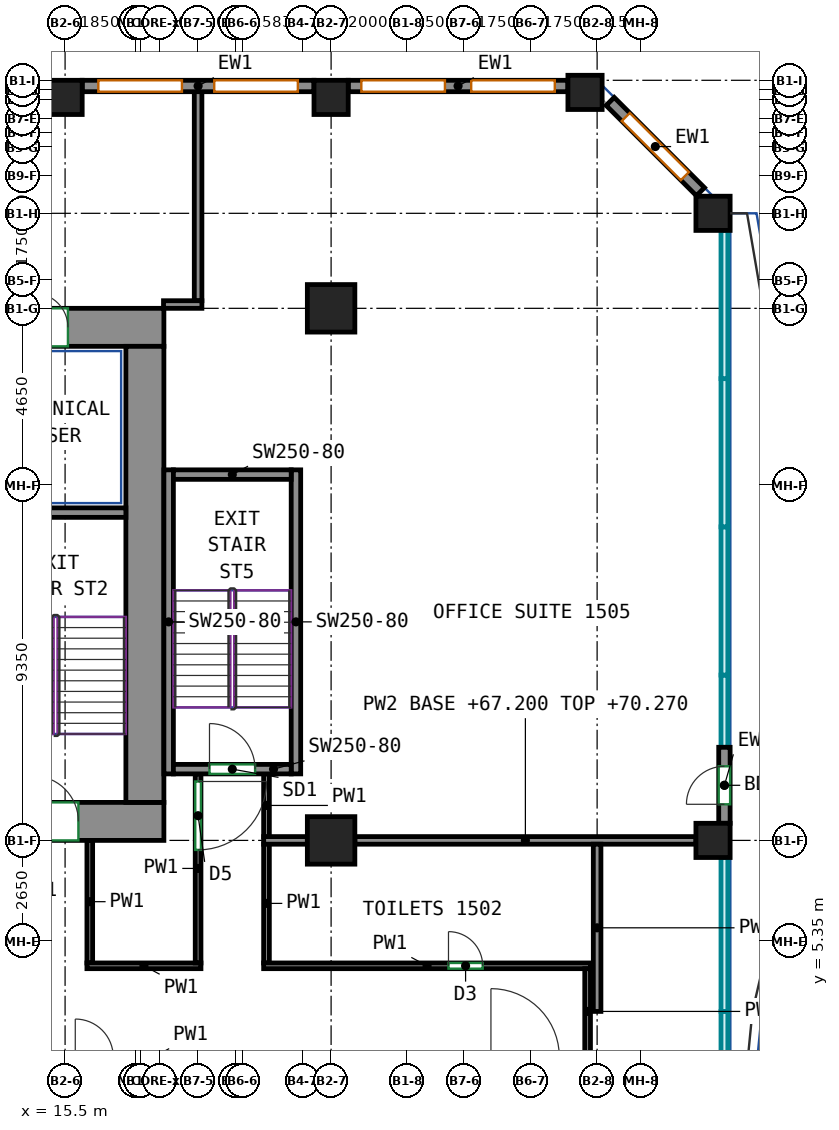
"""IFC4 building model, lengths in metres.
Left out: names, types, materials, properties, quantities, classifications, styles, units other than length and angle.
Written with IfcOpenShell. Run it as: python <this file> out.ifc"""

import sys

from ifc_helpers import new_model, si_unit, direction, frame, frame_2d, origin, origin_2d, place, context, subcontext, project, spatial, rectangle, extrude, source, transform, mapped, element, fill, save


model = new_model("IFC4")
c1 = context("Model", 3, precision=1e-05, world=origin(), true_north=direction((0.0, 1.0)))
c2 = subcontext(c1, "Body", "Model", "MODEL_VIEW")
j1 = project(units=[si_unit("LENGTHUNIT", "METRE"), si_unit("PLANEANGLEUNIT", "RADIAN")], contexts=[c1])
p1 = place(None, origin())
s1 = spatial("IfcSite", under=j1, at=p1, CompositionType="ELEMENT")
p2 = place(p1, origin())
s2 = spatial("IfcBuilding", under=s1, at=p2, CompositionType="ELEMENT")
p3 = place(p2, frame((0.0, 0.0, 67.2)))
s3 = spatial("IfcBuildingStorey", under=s2, at=p3, CompositionType="ELEMENT", Elevation=67.2)
m1 = source(origin(), c2, "Body", "SweptSolid", [
    extrude(rectangle(XDim=0.9, YDim=0.9, at=origin_2d()), origin(), (0.0, 0.0, 1.0), 3.72),
])
p4 = place(p3, frame((15.5, 27.55, 0.0), z_axis=(0.0, 0.0, 1.0), x_axis=(1.0, 0.0, 0.0)))
e1 = element("IfcColumn", 1, at=p4, inside=s3, PredefinedType="COLUMN", context=c2, shape_type="MappedRepresentation", body=[
    mapped(m1, transform((0.0, 0.0, 0.0))),
])
m2 = source(origin(), c2, "Body", "SweptSolid", [
    extrude(rectangle(XDim=1.25, YDim=1.25, at=origin_2d()), origin(), (0.0, 0.0, 1.0), 3.72),
])
for number, where, z_axis, x_axis in (
    (2, (22.5, 8.0, 0.0), (0.0, 0.0, 1.0), (1.0, 0.0, 0.0)),
    (3, (22.5, 22.0, 0.0), (0.0, 0.0, 1.0), (1.0, 0.0, 0.0)),
):
    element("IfcColumn", number, at=place(p3, frame(where, z_axis=z_axis, x_axis=x_axis)), inside=s3, PredefinedType="COLUMN", context=c2, shape_type="MappedRepresentation", body=[
        mapped(m2, transform((0.0, 0.0, 0.0))),
    ])
for number, where, z_axis, x_axis in (
    (4, (22.5, 27.55, 0.0), (0.0, 0.0, 1.0), (1.0, 0.0, 0.0)),
    (5, (29.182, 27.682, 0.0), (0.0, 0.0, 1.0), (1.0, 0.0, 0.0)),
    (6, (32.55, 8.0, 0.0), (0.0, 0.0, 1.0), (1.0, 0.0, 0.0)),
    (7, (32.55, 24.5, 0.0), (0.0, 0.0, 1.0), (1.0, 0.0, 0.0)),
):
    element("IfcColumn", number, at=place(p3, frame(where, z_axis=z_axis, x_axis=x_axis)), inside=s3, PredefinedType="COLUMN", context=c2, shape_type="MappedRepresentation", body=[
        mapped(m1, transform((0.0, 0.0, 0.0))),
    ])
m3 = source(origin(), c2, "Body", "SweptSolid", [
    extrude(rectangle(XDim=5.63, YDim=1.0, at=frame_2d((2.815, 0.0))), origin(), (0.0, 0.0, 1.0), 3.72),
])
p5 = place(p3, frame((12.47, 8.5, 0.0), z_axis=(0.0, 0.0, 1.0), x_axis=(1.0, 0.0, 0.0)))
e8 = element("IfcWall", 8, at=p5, inside=s3, PredefinedType="SHEAR", context=c2, shape_type="MappedRepresentation", body=[
    mapped(m3, transform((0.0, 0.0, 0.0))),
])
p6 = place(p5, frame((2.18, 0.0, 0.0)))
e9 = element("IfcOpeningElement", 9, at=p6, cuts=e8, PredefinedType="OPENING", context=c2, shape_type="SweptSolid", body=[
    extrude(rectangle(XDim=1.2, YDim=2.1, at=frame_2d((0.6, 1.05))), frame((0.0, 0.51, 0.0), z_axis=(0.0, -1.0, 0.0), x_axis=(1.0, 0.0, 0.0)), (0.0, 0.0, 1.0), 1.02),
])
m4 = source(origin(), c2, "Body", "SweptSolid", [
    extrude(rectangle(XDim=34.1, YDim=1.0, at=frame_2d((17.05, 0.0))), origin(), (0.0, 0.0, 1.0), 3.72),
])
p7 = place(p3, frame((-16.0, 21.5, 0.0), z_axis=(0.0, 0.0, 1.0), x_axis=(1.0, 0.0, 0.0)))
e10 = element("IfcWall", 10, at=p7, inside=s3, PredefinedType="SHEAR", context=c2, shape_type="MappedRepresentation", body=[
    mapped(m4, transform((0.0, 0.0, 0.0))),
])
p8 = place(p7, frame((8.52, 0.0, 0.0)))
e11 = element("IfcOpeningElement", 11, at=p8, cuts=e10, PredefinedType="OPENING", context=c2, shape_type="SweptSolid", body=[
    extrude(rectangle(XDim=0.9, YDim=2.1, at=frame_2d((0.45, 1.05))), frame((0.0, 0.51, 0.0), z_axis=(0.0, -1.0, 0.0), x_axis=(1.0, 0.0, 0.0)), (0.0, 0.0, 1.0), 1.02),
])
p9 = place(p7, frame((14.55, 0.0, 0.0)))
e12 = element("IfcOpeningElement", 12, at=p9, cuts=e10, PredefinedType="OPENING", context=c2, shape_type="SweptSolid", body=[
    extrude(rectangle(XDim=0.9, YDim=2.1, at=frame_2d((0.45, 1.05))), frame((0.0, 0.51, 0.0), z_axis=(0.0, -1.0, 0.0), x_axis=(1.0, 0.0, 0.0)), (0.0, 0.0, 1.0), 1.02),
])
p10 = place(p7, frame((19.374, 0.0, 0.0)))
e13 = element("IfcOpeningElement", 13, at=p10, cuts=e10, PredefinedType="OPENING", context=c2, shape_type="SweptSolid", body=[
    extrude(rectangle(XDim=0.9, YDim=2.1, at=frame_2d((0.45, 1.05))), frame((0.0, 0.51, 0.0), z_axis=(0.0, -1.0, 0.0), x_axis=(1.0, 0.0, 0.0)), (0.0, 0.0, 1.0), 1.02),
])
p11 = place(p7, frame((25.404, 0.0, 0.0)))
e14 = element("IfcOpeningElement", 14, at=p11, cuts=e10, PredefinedType="OPENING", context=c2, shape_type="SweptSolid", body=[
    extrude(rectangle(XDim=0.9, YDim=2.1, at=frame_2d((0.45, 1.05))), frame((0.0, 0.51, 0.0), z_axis=(0.0, -1.0, 0.0), x_axis=(1.0, 0.0, 0.0)), (0.0, 0.0, 1.0), 1.02),
])
p12 = place(p7, frame((2.525, 0.0, 0.0)))
e15 = element("IfcOpeningElement", 15, at=p12, cuts=e10, PredefinedType="OPENING", context=c2, shape_type="SweptSolid", body=[
    extrude(rectangle(XDim=0.9, YDim=2.1, at=frame_2d((0.45, 1.05))), frame((0.0, 0.51, 0.0), z_axis=(0.0, -1.0, 0.0), x_axis=(1.0, 0.0, 0.0)), (0.0, 0.0, 1.0), 1.02),
])
p13 = place(p7, frame((30.675, 0.0, 0.0)))
e16 = element("IfcOpeningElement", 16, at=p13, cuts=e10, PredefinedType="OPENING", context=c2, shape_type="SweptSolid", body=[
    extrude(rectangle(XDim=0.9, YDim=2.1, at=frame_2d((0.45, 1.05))), frame((0.0, 0.51, 0.0), z_axis=(0.0, -1.0, 0.0), x_axis=(1.0, 0.0, 0.0)), (0.0, 0.0, 1.0), 1.02),
])
m5 = source(origin(), c2, "Body", "SweptSolid", [
    extrude(rectangle(XDim=12.0, YDim=1.0, at=frame_2d((6.0, 0.0))), origin(), (0.0, 0.0, 1.0), 3.72),
])
p14 = place(p3, frame((17.6, 9.0, 0.0), z_axis=(0.0, 0.0, 1.0), x_axis=(0.0, 1.0, 0.0)))
e17 = element("IfcWall", 17, at=p14, inside=s3, PredefinedType="SHEAR", context=c2, shape_type="MappedRepresentation", body=[
    mapped(m5, transform((0.0, 0.0, 0.0))),
])
m6 = source(origin(), c2, "Body", "SweptSolid", [
    extrude(rectangle(XDim=3.7, YDim=0.25, at=frame_2d((1.85, 0.0))), origin(), (0.0, 0.0, 1.0), 3.72),
])
p15 = place(p3, frame((13.4, 16.625, 0.0), z_axis=(0.0, 0.0, 1.0), x_axis=(1.0, 0.0, 0.0)))
e18 = element("IfcWall", 18, at=p15, inside=s3, PredefinedType="SHEAR", context=c2, shape_type="MappedRepresentation", body=[
    mapped(m6, transform((0.0, 0.0, 0.0))),
])
m7 = source(origin(), c2, "Body", "SweptSolid", [
    extrude(rectangle(XDim=8.0, YDim=0.25, at=frame_2d((4.0, 0.0))), origin(), (0.0, 0.0, 1.0), 3.72),
])
for number, where, z_axis, x_axis in (
    (19, (18.225, 9.75, 0.0), (0.0, 0.0, 1.0), (0.0, 1.0, 0.0)),
    (20, (21.575, 9.75, 0.0), (0.0, 0.0, 1.0), (0.0, 1.0, 0.0)),
):
    element("IfcWall", number, at=place(p3, frame(where, z_axis=z_axis, x_axis=x_axis)), inside=s3, PredefinedType="SHEAR", context=c2, shape_type="MappedRepresentation", body=[
        mapped(m7, transform((0.0, 0.0, 0.0))),
    ])
m8 = source(origin(), c2, "Body", "SweptSolid", [
    extrude(rectangle(XDim=3.1, YDim=0.25, at=frame_2d((1.55, 0.0))), origin(), (0.0, 0.0, 1.0), 3.72),
])
p16 = place(p3, frame((18.35, 9.875, 0.0), z_axis=(0.0, 0.0, 1.0), x_axis=(1.0, 0.0, 0.0)))
e21 = element("IfcWall", 21, at=p16, inside=s3, PredefinedType="SHEAR", context=c2, shape_type="MappedRepresentation", body=[
    mapped(m8, transform((0.0, 0.0, 0.0))),
])
p17 = place(p16, frame((0.95, 0.0, 0.0)))
e22 = element("IfcOpeningElement", 22, at=p17, cuts=e21, PredefinedType="OPENING", context=c2, shape_type="SweptSolid", body=[
    extrude(rectangle(XDim=1.2, YDim=2.1, at=frame_2d((0.6, 1.05))), frame((0.0, 0.135, 0.0), z_axis=(0.0, -1.0, 0.0), x_axis=(1.0, 0.0, 0.0)), (0.0, 0.0, 1.0), 0.27),
])
p18 = place(p3, frame((18.35, 17.625, 0.0), z_axis=(0.0, 0.0, 1.0), x_axis=(1.0, 0.0, 0.0)))
e23 = element("IfcWall", 23, at=p18, inside=s3, PredefinedType="SHEAR", context=c2, shape_type="MappedRepresentation", body=[
    mapped(m8, transform((0.0, 0.0, 0.0))),
])
m9 = source(origin(), c2, "Body", "SweptSolid", [
    extrude(rectangle(XDim=2.0, YDim=0.3, at=frame_2d((1.0, 0.0))), origin(), (0.0, 0.0, 1.0), 3.72),
])
p19 = place(p3, frame((32.85, 8.45, 0.0), z_axis=(0.0, 0.0, 1.0), x_axis=(0.0, 1.0, 0.0)))
e24 = element("IfcWall", 24, at=p19, inside=s3, PredefinedType="SOLIDWALL", context=c2, shape_type="MappedRepresentation", body=[
    mapped(m9, transform((0.0, 0.0, 0.0))),
])
p20 = place(p19, frame((0.5, 0.0, 0.0)))
e25 = element("IfcOpeningElement", 25, at=p20, cuts=e24, PredefinedType="OPENING", context=c2, shape_type="SweptSolid", body=[
    extrude(rectangle(XDim=1.0, YDim=2.1, at=frame_2d((0.5, 1.05))), frame((0.0, 0.16, 0.0), z_axis=(0.0, -1.0, 0.0), x_axis=(1.0, 0.0, 0.0)), (0.0, 0.0, 1.0), 0.32),
])
m10 = source(origin(), c2, "Body", "SweptSolid", [
    extrude(rectangle(XDim=3.359, YDim=0.3, at=frame_2d((1.679, 0.0))), origin(), (0.0, 0.0, 1.0), 3.72),
])
p21 = place(p3, frame((32.219, 25.069, 0.0), z_axis=(0.0, 0.0, 1.0), x_axis=(-0.707070438228, 0.707143122278, 0.0)))
e26 = element("IfcWall", 26, at=p21, inside=s3, PredefinedType="SOLIDWALL", context=c2, shape_type="MappedRepresentation", body=[
    mapped(m10, transform((0.0, 0.0, 0.0))),
])
p22 = place(p21, frame((0.579, 0.0, 0.7)))
e27 = element("IfcOpeningElement", 27, at=p22, cuts=e26, PredefinedType="OPENING", context=c2, shape_type="SweptSolid", body=[
    extrude(rectangle(XDim=2.2, YDim=2.25, at=frame_2d((1.1, 1.125))), frame((0.0, 0.16, 0.0), z_axis=(0.0, -1.0, 0.0), x_axis=(1.0, 0.0, 0.0)), (0.0, 0.0, 1.0), 0.32),
])
m11 = source(origin(), c2, "Body", "SweptSolid", [
    extrude(rectangle(XDim=5.782, YDim=0.3, at=frame_2d((2.891, 0.0))), origin(), (0.0, 0.0, 1.0), 3.72),
])
p23 = place(p3, frame((28.732, 27.85, 0.0), z_axis=(0.0, 0.0, 1.0), x_axis=(-1.0, 0.0, 0.0)))
e28 = element("IfcWall", 28, at=p23, inside=s3, PredefinedType="SOLIDWALL", context=c2, shape_type="MappedRepresentation", body=[
    mapped(m11, transform((0.0, 0.0, 0.0))),
])
p24 = place(p23, frame((0.345, 0.0, 0.7)))
e29 = element("IfcOpeningElement", 29, at=p24, cuts=e28, PredefinedType="OPENING", context=c2, shape_type="SweptSolid", body=[
    extrude(rectangle(XDim=2.2, YDim=2.25, at=frame_2d((1.1, 1.125))), frame((0.0, 0.16, 0.0), z_axis=(0.0, -1.0, 0.0), x_axis=(1.0, 0.0, 0.0)), (0.0, 0.0, 1.0), 0.32),
])
p25 = place(p23, frame((3.236, 0.0, 0.7)))
e30 = element("IfcOpeningElement", 30, at=p25, cuts=e28, PredefinedType="OPENING", context=c2, shape_type="SweptSolid", body=[
    extrude(rectangle(XDim=2.2, YDim=2.25, at=frame_2d((1.1, 1.125))), frame((0.0, 0.16, 0.0), z_axis=(0.0, -1.0, 0.0), x_axis=(1.0, 0.0, 0.0)), (0.0, 0.0, 1.0), 0.32),
])
m12 = source(origin(), c2, "Body", "SweptSolid", [
    extrude(rectangle(XDim=6.1, YDim=0.3, at=frame_2d((3.05, 0.0))), origin(), (0.0, 0.0, 1.0), 3.72),
])
p26 = place(p3, frame((22.05, 27.85, 0.0), z_axis=(0.0, 0.0, 1.0), x_axis=(-1.0, 0.0, 0.0)))
e31 = element("IfcWall", 31, at=p26, inside=s3, PredefinedType="SOLIDWALL", context=c2, shape_type="MappedRepresentation", body=[
    mapped(m12, transform((0.0, 0.0, 0.0))),
])
p27 = place(p26, frame((0.425, 0.0, 0.7)))
e32 = element("IfcOpeningElement", 32, at=p27, cuts=e31, PredefinedType="OPENING", context=c2, shape_type="SweptSolid", body=[
    extrude(rectangle(XDim=2.2, YDim=2.25, at=frame_2d((1.1, 1.125))), frame((0.0, 0.16, 0.0), z_axis=(0.0, -1.0, 0.0), x_axis=(1.0, 0.0, 0.0)), (0.0, 0.0, 1.0), 0.32),
])
p28 = place(p26, frame((3.475, 0.0, 0.7)))
e33 = element("IfcOpeningElement", 33, at=p28, cuts=e31, PredefinedType="OPENING", context=c2, shape_type="SweptSolid", body=[
    extrude(rectangle(XDim=2.2, YDim=2.25, at=frame_2d((1.1, 1.125))), frame((0.0, 0.16, 0.0), z_axis=(0.0, -1.0, 0.0), x_axis=(1.0, 0.0, 0.0)), (0.0, 0.0, 1.0), 0.32),
])
p29 = place(p3, frame((16.15, 4.775, 0.0), z_axis=(0.0, 0.0, 1.0), x_axis=(0.0, 1.0, 0.0)))
e34 = element("IfcWall", 34, at=p29, inside=s3, PredefinedType="PARTITIONING", context=c2, shape_type="SweptSolid", body=[
    extrude(rectangle(XDim=3.225, YDim=0.15, at=frame_2d((1.613, 0.0))), origin(), (0.0, 0.0, 1.0), 3.72),
])
p30 = place(p3, frame((16.075, 4.7, 0.0), z_axis=(0.0, 0.0, 1.0), x_axis=(1.0, 0.0, 0.0)))
e35 = element("IfcWall", 35, at=p30, inside=s3, PredefinedType="PARTITIONING", context=c2, shape_type="SweptSolid", body=[
    extrude(rectangle(XDim=3.0, YDim=0.15, at=frame_2d((1.5, 0.0))), origin(), (0.0, 0.0, 1.0), 3.72),
])
p31 = place(p3, frame((19.0, 9.75, 0.0), z_axis=(0.0, 0.0, 1.0), x_axis=(0.0, -1.0, 0.0)))
e36 = element("IfcWall", 36, at=p31, inside=s3, PredefinedType="PARTITIONING", context=c2, shape_type="SweptSolid", body=[
    extrude(rectangle(XDim=4.975, YDim=0.15, at=frame_2d((2.488, 0.0))), origin(), (0.0, 0.0, 1.0), 3.72),
])
p32 = place(p31, frame((0.2, 0.0, 0.0)))
e37 = element("IfcOpeningElement", 37, at=p32, cuts=e36, PredefinedType="OPENING", context=c2, shape_type="SweptSolid", body=[
    extrude(rectangle(XDim=1.8, YDim=2.1, at=frame_2d((0.9, 1.05))), frame((0.0, 0.085, 0.0), z_axis=(0.0, -1.0, 0.0), x_axis=(1.0, 0.0, 0.0)), (0.0, 0.0, 1.0), 0.17),
])
p33 = place(p3, frame((20.8, 8.09, 0.0), z_axis=(0.0, 0.0, 1.0), x_axis=(0.0, 1.0, 0.0)))
e38 = element("IfcWall", 38, at=p33, inside=s3, PredefinedType="PARTITIONING", context=c2, shape_type="SweptSolid", body=[
    extrude(rectangle(XDim=1.66, YDim=0.15, at=frame_2d((0.83, 0.0))), origin(), (0.0, 0.0, 1.0), 3.72),
])
p34 = place(p3, frame((20.8, 4.775, 0.0), z_axis=(0.0, 0.0, 1.0), x_axis=(0.0, 1.0, 0.0)))
e39 = element("IfcWall", 39, at=p34, inside=s3, PredefinedType="PARTITIONING", context=c2, shape_type="SweptSolid", body=[
    extrude(rectangle(XDim=3.135, YDim=0.15, at=frame_2d((1.567, 0.0))), origin(), (0.0, 0.0, 1.0), 3.72),
])
p35 = place(p3, frame((20.725, 4.7, 0.0), z_axis=(0.0, 0.0, 1.0), x_axis=(1.0, 0.0, 0.0)))
e40 = element("IfcWall", 40, at=p35, inside=s3, PredefinedType="PARTITIONING", context=c2, shape_type="SweptSolid", body=[
    extrude(rectangle(XDim=8.6, YDim=0.15, at=frame_2d((4.3, 0.0))), origin(), (0.0, 0.0, 1.0), 3.72),
])
p36 = place(p35, frame((4.864, 0.0, 0.0)))
e41 = element("IfcOpeningElement", 41, at=p36, cuts=e40, PredefinedType="OPENING", context=c2, shape_type="SweptSolid", body=[
    extrude(rectangle(XDim=0.9, YDim=2.1, at=frame_2d((0.45, 1.05))), frame((0.0, 0.085, 0.0), z_axis=(0.0, -1.0, 0.0), x_axis=(1.0, 0.0, 0.0)), (0.0, 0.0, 1.0), 0.17),
])
p37 = place(p3, frame((29.25, 2.375, 0.0), z_axis=(0.0, 0.0, 1.0), x_axis=(0.0, 1.0, 0.0)))
e42 = element("IfcWall", 42, at=p37, inside=s3, PredefinedType="PARTITIONING", context=c2, shape_type="SweptSolid", body=[
    extrude(rectangle(XDim=2.25, YDim=0.15, at=frame_2d((1.125, 0.0))), origin(), (0.0, 0.0, 1.0), 3.07),
])
p38 = place(p3, frame((19.0, 22.2, 0.0), z_axis=(0.0, 0.0, 1.0), x_axis=(0.0, 1.0, 0.0)))
e43 = element("IfcWall", 43, at=p38, inside=s3, PredefinedType="PARTITIONING", context=c2, shape_type="SweptSolid", body=[
    extrude(rectangle(XDim=5.55, YDim=0.2, at=frame_2d((2.775, 0.0))), origin(), (0.0, 0.0, 1.0), 3.72),
])
p39 = place(p3, frame((18.09, 22.1, 0.0), z_axis=(0.0, 0.0, 1.0), x_axis=(1.0, 0.0, 0.0)))
e44 = element("IfcWall", 44, at=p39, inside=s3, PredefinedType="PARTITIONING", context=c2, shape_type="SweptSolid", body=[
    extrude(rectangle(XDim=1.01, YDim=0.2, at=frame_2d((0.505, 0.0))), origin(), (0.0, 0.0, 1.0), 3.72),
])
p40 = place(p3, frame((23.125, 8.0, 0.0), z_axis=(0.0, 0.0, 1.0), x_axis=(1.0, 0.0, 0.0)))
e45 = element("IfcWall", 45, at=p40, inside=s3, PredefinedType="PARTITIONING", context=c2, shape_type="SweptSolid", body=[
    extrude(rectangle(XDim=8.975, YDim=0.2, at=frame_2d((4.488, 0.0))), origin(), (0.0, 0.0, 1.0), 3.07),
])
p41 = place(p3, frame((20.726, 8.0, 0.0), z_axis=(0.0, 0.0, 1.0), x_axis=(1.0, 0.0, 0.0)))
e46 = element("IfcWall", 46, at=p41, inside=s3, PredefinedType="PARTITIONING", context=c2, shape_type="SweptSolid", body=[
    extrude(rectangle(XDim=1.149, YDim=0.2, at=frame_2d((0.574, 0.0))), origin(), (0.0, 0.0, 1.0), 3.72),
])
p42 = place(p3, frame((29.5, 3.5, 0.0), z_axis=(0.0, 0.0, 1.0), x_axis=(0.0, 1.0, 0.0)))
e47 = element("IfcWall", 47, at=p42, inside=s3, PredefinedType="PARTITIONING", context=c2, shape_type="SweptSolid", body=[
    extrude(rectangle(XDim=4.4, YDim=0.2, at=frame_2d((2.2, 0.0))), origin(), (0.0, 0.0, 1.0), 3.07),
])
p43 = place(p20, origin())
e48 = element("IfcDoor", 48, at=p43, inside=s3, OperationType="SINGLE_SWING_LEFT", PredefinedType="DOOR", context=c2, shape_type="SweptSolid", body=[
    extrude(rectangle(XDim=1.0, YDim=2.1, at=frame_2d((0.5, 1.05))), frame((0.0, 0.025, 0.0), z_axis=(0.0, -1.0, 0.0), x_axis=(1.0, 0.0, 0.0)), (0.0, 0.0, 1.0), 0.05),
])
fill(e25, e48)
p44 = place(p22, origin())
e49 = element("IfcWindow", 49, at=p44, inside=s3, PartitioningType="SINGLE_PANEL", PredefinedType="WINDOW", context=c2, shape_type="SweptSolid", body=[
    extrude(rectangle(XDim=2.2, YDim=2.25, at=frame_2d((1.1, 1.125))), frame((0.0, 0.03, 0.0), z_axis=(0.0, -1.0, 0.0), x_axis=(1.0, 0.0, 0.0)), (0.0, 0.0, 1.0), 0.06),
])
fill(e27, e49)
p45 = place(p24, origin())
e50 = element("IfcWindow", 50, at=p45, inside=s3, PartitioningType="SINGLE_PANEL", PredefinedType="WINDOW", context=c2, shape_type="SweptSolid", body=[
    extrude(rectangle(XDim=2.2, YDim=2.25, at=frame_2d((1.1, 1.125))), frame((0.0, 0.03, 0.0), z_axis=(0.0, -1.0, 0.0), x_axis=(1.0, 0.0, 0.0)), (0.0, 0.0, 1.0), 0.06),
])
fill(e29, e50)
p46 = place(p25, origin())
e51 = element("IfcWindow", 51, at=p46, inside=s3, PartitioningType="SINGLE_PANEL", PredefinedType="WINDOW", context=c2, shape_type="SweptSolid", body=[
    extrude(rectangle(XDim=2.2, YDim=2.25, at=frame_2d((1.1, 1.125))), frame((0.0, 0.03, 0.0), z_axis=(0.0, -1.0, 0.0), x_axis=(1.0, 0.0, 0.0)), (0.0, 0.0, 1.0), 0.06),
])
fill(e30, e51)
p47 = place(p27, origin())
e52 = element("IfcWindow", 52, at=p47, inside=s3, PartitioningType="SINGLE_PANEL", PredefinedType="WINDOW", context=c2, shape_type="SweptSolid", body=[
    extrude(rectangle(XDim=2.2, YDim=2.25, at=frame_2d((1.1, 1.125))), frame((0.0, 0.03, 0.0), z_axis=(0.0, -1.0, 0.0), x_axis=(1.0, 0.0, 0.0)), (0.0, 0.0, 1.0), 0.06),
])
fill(e32, e52)
p48 = place(p28, origin())
e53 = element("IfcWindow", 53, at=p48, inside=s3, PartitioningType="SINGLE_PANEL", PredefinedType="WINDOW", context=c2, shape_type="SweptSolid", body=[
    extrude(rectangle(XDim=2.2, YDim=2.25, at=frame_2d((1.1, 1.125))), frame((0.0, 0.03, 0.0), z_axis=(0.0, -1.0, 0.0), x_axis=(1.0, 0.0, 0.0)), (0.0, 0.0, 1.0), 0.06),
])
fill(e33, e53)
p49 = place(p13, origin())
e54 = element("IfcDoor", 54, at=p49, inside=s3, OperationType="SINGLE_SWING_LEFT", PredefinedType="DOOR", context=c2, shape_type="SweptSolid", body=[
    extrude(rectangle(XDim=0.9, YDim=2.1, at=frame_2d((0.45, 1.05))), frame((0.0, -0.355, 0.0), z_axis=(0.0, -1.0, 0.0), x_axis=(1.0, 0.0, 0.0)), (0.0, 0.0, 1.0), 0.05),
])
fill(e16, e54)
p50 = place(p6, origin())
e55 = element("IfcDoor", 55, at=p50, inside=s3, OperationType="DOUBLE_DOOR_SINGLE_SWING", PredefinedType="DOOR", context=c2, shape_type="SweptSolid", body=[
    extrude(rectangle(XDim=1.2, YDim=2.1, at=frame_2d((0.6, 1.05))), frame((0.0, 0.405, 0.0), z_axis=(0.0, -1.0, 0.0), x_axis=(1.0, 0.0, 0.0)), (0.0, 0.0, 1.0), 0.05),
])
fill(e9, e55)
p51 = place(p17, origin())
e56 = element("IfcDoor", 56, at=p51, inside=s3, OperationType="DOUBLE_DOOR_SINGLE_SWING", PredefinedType="DOOR", context=c2, shape_type="SweptSolid", body=[
    extrude(rectangle(XDim=1.2, YDim=2.1, at=frame_2d((0.6, 1.05))), frame((0.0, 0.025, 0.0), z_axis=(0.0, -1.0, 0.0), x_axis=(1.0, 0.0, 0.0)), (0.0, 0.0, 1.0), 0.05),
])
fill(e22, e56)
p52 = place(p36, origin())
e57 = element("IfcDoor", 57, at=p52, inside=s3, OperationType="SINGLE_SWING_LEFT", PredefinedType="DOOR", context=c2, shape_type="SweptSolid", body=[
    extrude(rectangle(XDim=0.9, YDim=2.1, at=frame_2d((0.45, 1.05))), frame((0.0, 0.025, 0.0), z_axis=(0.0, -1.0, 0.0), x_axis=(1.0, 0.0, 0.0)), (0.0, 0.0, 1.0), 0.05),
])
fill(e41, e57)
p53 = place(p32, origin())
e58 = element("IfcDoor", 58, at=p53, inside=s3, OperationType="DOUBLE_DOOR_SINGLE_SWING", PredefinedType="DOOR", context=c2, shape_type="SweptSolid", body=[
    extrude(rectangle(XDim=1.8, YDim=2.1, at=frame_2d((0.9, 1.05))), frame((0.0, 0.025, 0.0), z_axis=(0.0, -1.0, 0.0), x_axis=(1.0, 0.0, 0.0)), (0.0, 0.0, 1.0), 0.05),
])
fill(e37, e58)
save(model, sys.argv[1])
